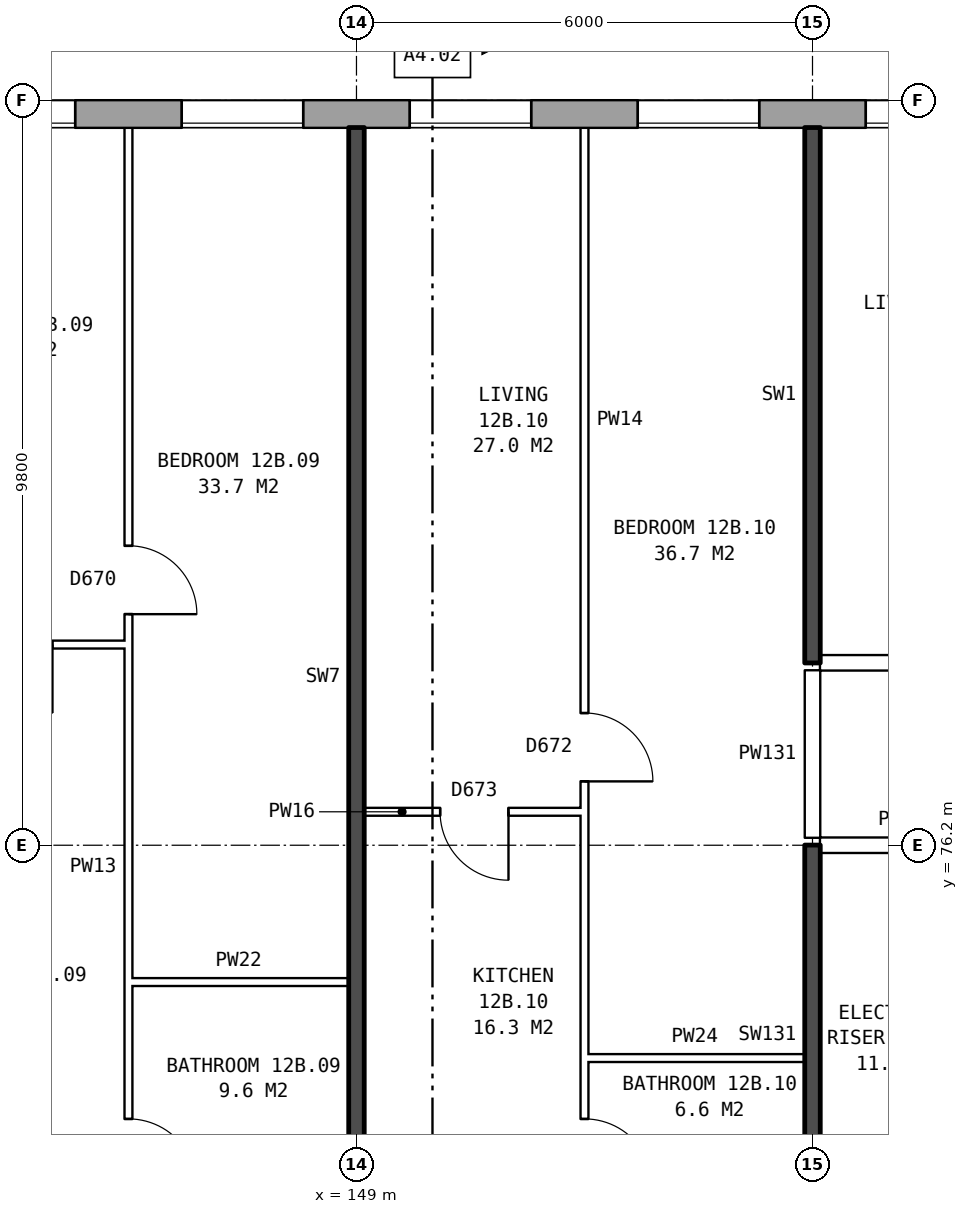
"""IFC4 building model, lengths in metres.
Left out: names, types, materials, properties, quantities, classifications, styles, units other than length and angle.
Written with IfcOpenShell. Run it as: python <this file> out.ifc"""

import sys

from ifc_helpers import new_model, si_unit, direction, frame, frame_2d, origin, place, context, subcontext, project, spatial, rectangle, extrude, element, fill, save


model = new_model("IFC4")
c1 = context("Model", 3, precision=1e-05, world=origin(), true_north=direction((0.0, 1.0)))
c2 = subcontext(c1, "Body", "Model", "MODEL_VIEW")
j1 = project(units=[si_unit("LENGTHUNIT", "METRE"), si_unit("PLANEANGLEUNIT", "RADIAN")], contexts=[c1])
p1 = place(None, origin())
s1 = spatial("IfcSite", under=j1, at=p1, CompositionType="ELEMENT")
p2 = place(p1, origin())
s2 = spatial("IfcBuilding", under=s1, at=p2, CompositionType="ELEMENT")
p3 = place(p2, frame((0.0, 0.0, 47.4)))
s3 = spatial("IfcBuildingStorey", under=s2, at=p3, CompositionType="ELEMENT", Elevation=47.4)
p4 = place(p3, frame((173.425, 85.82, 0.0), z_axis=(0.0, 0.0, 1.0), x_axis=(-1.0, 0.0, 0.0)))
e1 = element("IfcWall", 1, at=p4, inside=s3, PredefinedType="STANDARD", context=c2, shape_type="SweptSolid", body=[
    extrude(rectangle(XDim=39.351, YDim=0.36, at=frame_2d((19.675, 0.0))), origin(), (0.0, 0.0, 1.0), 2.85),
])
p5 = place(p4, frame((0.625, 0.0, 0.8)))
e2 = element("IfcOpeningElement", 2, at=p5, cuts=e1, PredefinedType="OPENING", context=c2, shape_type="SweptSolid", body=[
    extrude(rectangle(XDim=1.0, YDim=1.8, at=frame_2d((0.5, 0.9))), frame((0.0, 0.19, 0.0), z_axis=(0.0, -1.0, 0.0), x_axis=(1.0, 0.0, 0.0)), (0.0, 0.0, 1.0), 0.38),
])
p6 = place(p4, frame((1.925, 0.0, 1.7)))
e3 = element("IfcOpeningElement", 3, at=p6, cuts=e1, PredefinedType="OPENING", context=c2, shape_type="SweptSolid", body=[
    extrude(rectangle(XDim=0.8, YDim=0.9, at=frame_2d((0.4, 0.45))), frame((0.0, 0.19, 0.0), z_axis=(0.0, -1.0, 0.0), x_axis=(1.0, 0.0, 0.0)), (0.0, 0.0, 1.0), 0.38),
])
p7 = place(p4, frame((7.125, 0.0, 0.8)))
e4 = element("IfcOpeningElement", 4, at=p7, cuts=e1, PredefinedType="OPENING", context=c2, shape_type="SweptSolid", body=[
    extrude(rectangle(XDim=1.6, YDim=1.8, at=frame_2d((0.8, 0.9))), frame((0.0, 0.19, 0.0), z_axis=(0.0, -1.0, 0.0), x_axis=(1.0, 0.0, 0.0)), (0.0, 0.0, 1.0), 0.38),
])
p8 = place(p4, frame((10.125, 0.0, 0.8)))
e5 = element("IfcOpeningElement", 5, at=p8, cuts=e1, PredefinedType="OPENING", context=c2, shape_type="SweptSolid", body=[
    extrude(rectangle(XDim=1.6, YDim=1.8, at=frame_2d((0.8, 0.9))), frame((0.0, 0.19, 0.0), z_axis=(0.0, -1.0, 0.0), x_axis=(1.0, 0.0, 0.0)), (0.0, 0.0, 1.0), 0.38),
])
p9 = place(p4, frame((13.125, 0.0, 0.8)))
e6 = element("IfcOpeningElement", 6, at=p9, cuts=e1, PredefinedType="OPENING", context=c2, shape_type="SweptSolid", body=[
    extrude(rectangle(XDim=1.6, YDim=1.8, at=frame_2d((0.8, 0.9))), frame((0.0, 0.19, 0.0), z_axis=(0.0, -1.0, 0.0), x_axis=(1.0, 0.0, 0.0)), (0.0, 0.0, 1.0), 0.38),
])
p10 = place(p4, frame((16.125, 0.0, 0.8)))
e7 = element("IfcOpeningElement", 7, at=p10, cuts=e1, PredefinedType="OPENING", context=c2, shape_type="SweptSolid", body=[
    extrude(rectangle(XDim=1.6, YDim=1.8, at=frame_2d((0.8, 0.9))), frame((0.0, 0.19, 0.0), z_axis=(0.0, -1.0, 0.0), x_axis=(1.0, 0.0, 0.0)), (0.0, 0.0, 1.0), 0.38),
])
p11 = place(p4, frame((19.125, 0.0, 0.8)))
e8 = element("IfcOpeningElement", 8, at=p11, cuts=e1, PredefinedType="OPENING", context=c2, shape_type="SweptSolid", body=[
    extrude(rectangle(XDim=1.6, YDim=1.8, at=frame_2d((0.8, 0.9))), frame((0.0, 0.19, 0.0), z_axis=(0.0, -1.0, 0.0), x_axis=(1.0, 0.0, 0.0)), (0.0, 0.0, 1.0), 0.38),
])
p12 = place(p4, frame((22.125, 0.0, 0.8)))
e9 = element("IfcOpeningElement", 9, at=p12, cuts=e1, PredefinedType="OPENING", context=c2, shape_type="SweptSolid", body=[
    extrude(rectangle(XDim=1.6, YDim=1.8, at=frame_2d((0.8, 0.9))), frame((0.0, 0.19, 0.0), z_axis=(0.0, -1.0, 0.0), x_axis=(1.0, 0.0, 0.0)), (0.0, 0.0, 1.0), 0.38),
])
p13 = place(p4, frame((25.125, 0.0, 0.8)))
e10 = element("IfcOpeningElement", 10, at=p13, cuts=e1, PredefinedType="OPENING", context=c2, shape_type="SweptSolid", body=[
    extrude(rectangle(XDim=1.6, YDim=1.8, at=frame_2d((0.8, 0.9))), frame((0.0, 0.19, 0.0), z_axis=(0.0, -1.0, 0.0), x_axis=(1.0, 0.0, 0.0)), (0.0, 0.0, 1.0), 0.38),
])
p14 = place(p4, frame((28.125, 0.0, 0.8)))
e11 = element("IfcOpeningElement", 11, at=p14, cuts=e1, PredefinedType="OPENING", context=c2, shape_type="SweptSolid", body=[
    extrude(rectangle(XDim=1.6, YDim=1.8, at=frame_2d((0.8, 0.9))), frame((0.0, 0.19, 0.0), z_axis=(0.0, -1.0, 0.0), x_axis=(1.0, 0.0, 0.0)), (0.0, 0.0, 1.0), 0.38),
])
p15 = place(p4, frame((31.125, 0.0, 0.8)))
e12 = element("IfcOpeningElement", 12, at=p15, cuts=e1, PredefinedType="OPENING", context=c2, shape_type="SweptSolid", body=[
    extrude(rectangle(XDim=1.6, YDim=1.8, at=frame_2d((0.8, 0.9))), frame((0.0, 0.19, 0.0), z_axis=(0.0, -1.0, 0.0), x_axis=(1.0, 0.0, 0.0)), (0.0, 0.0, 1.0), 0.38),
])
p16 = place(p4, frame((33.025, 0.0, 0.8)))
e13 = element("IfcOpeningElement", 13, at=p16, cuts=e1, PredefinedType="OPENING", context=c2, shape_type="SweptSolid", body=[
    extrude(rectangle(XDim=1.2, YDim=1.8, at=frame_2d((0.6, 0.9))), frame((0.0, 0.19, 0.0), z_axis=(0.0, -1.0, 0.0), x_axis=(1.0, 0.0, 0.0)), (0.0, 0.0, 1.0), 0.38),
])
p17 = place(p4, frame((36.625, 0.0, 1.7)))
e14 = element("IfcOpeningElement", 14, at=p17, cuts=e1, PredefinedType="OPENING", context=c2, shape_type="SweptSolid", body=[
    extrude(rectangle(XDim=0.8, YDim=0.9, at=frame_2d((0.4, 0.45))), frame((0.0, 0.19, 0.0), z_axis=(0.0, -1.0, 0.0), x_axis=(1.0, 0.0, 0.0)), (0.0, 0.0, 1.0), 0.38),
])
p18 = place(p4, frame((3.925, 0.0, 0.8)))
e15 = element("IfcOpeningElement", 15, at=p18, cuts=e1, PredefinedType="OPENING", context=c2, shape_type="SweptSolid", body=[
    extrude(rectangle(XDim=0.8, YDim=0.9, at=frame_2d((0.4, 0.45))), frame((0.0, 0.19, 0.0), z_axis=(0.0, -1.0, 0.0), x_axis=(1.0, 0.0, 0.0)), (0.0, 0.0, 1.0), 0.38),
])
p19 = place(p4, frame((5.025, 0.0, 0.8)))
e16 = element("IfcOpeningElement", 16, at=p19, cuts=e1, PredefinedType="OPENING", context=c2, shape_type="SweptSolid", body=[
    extrude(rectangle(XDim=1.2, YDim=1.8, at=frame_2d((0.6, 0.9))), frame((0.0, 0.19, 0.0), z_axis=(0.0, -1.0, 0.0), x_axis=(1.0, 0.0, 0.0)), (0.0, 0.0, 1.0), 0.38),
])
p20 = place(p4, frame((34.525, 0.0, 0.8)))
e17 = element("IfcOpeningElement", 17, at=p20, cuts=e1, PredefinedType="OPENING", context=c2, shape_type="SweptSolid", body=[
    extrude(rectangle(XDim=0.8, YDim=0.9, at=frame_2d((0.4, 0.45))), frame((0.0, 0.19, 0.0), z_axis=(0.0, -1.0, 0.0), x_axis=(1.0, 0.0, 0.0)), (0.0, 0.0, 1.0), 0.38),
])
p21 = place(p4, frame((37.725, 0.0, 0.8)))
e18 = element("IfcOpeningElement", 18, at=p21, cuts=e1, PredefinedType="OPENING", context=c2, shape_type="SweptSolid", body=[
    extrude(rectangle(XDim=1.2, YDim=1.8, at=frame_2d((0.6, 0.9))), frame((0.0, 0.19, 0.0), z_axis=(0.0, -1.0, 0.0), x_axis=(1.0, 0.0, 0.0)), (0.0, 0.0, 1.0), 0.38),
])
for number, where, z_axis, x_axis in (
    (19, (152.0, 73.4, 0.0), (0.0, 0.0, 1.0), (1.0, 0.0, 0.0)),
    (20, (146.0, 74.4, 0.0), (0.0, 0.0, 1.0), (1.0, 0.0, 0.0)),
):
    element("IfcWall", number, at=place(p3, frame(where, z_axis=z_axis, x_axis=x_axis)), inside=s3, PredefinedType="PARTITIONING", context=c2, shape_type="SweptSolid", body=[
        extrude(rectangle(XDim=2.9, YDim=0.1, at=frame_2d((1.45, 0.0))), origin(), (0.0, 0.0, 1.0), 2.85),
    ])
p22 = place(p3, frame((155.1, 76.2, 0.0), z_axis=(0.0, 0.0, 1.0), x_axis=(1.0, 0.0, 0.0)))
e21 = element("IfcWall", 21, at=p22, inside=s3, PredefinedType="PARTITIONING", context=c2, shape_type="SweptSolid", body=[
    extrude(rectangle(XDim=2.14, YDim=0.2, at=frame_2d((1.07, 0.0))), origin(), (0.0, 0.0, 1.0), 2.85),
])
p23 = place(p3, frame((149.1, 76.64, 0.0), z_axis=(0.0, 0.0, 1.0), x_axis=(1.0, 0.0, 0.0)))
e22 = element("IfcWall", 22, at=p23, inside=s3, PredefinedType="PARTITIONING", context=c2, shape_type="SweptSolid", body=[
    extrude(rectangle(XDim=2.9, YDim=0.1, at=frame_2d((1.45, 0.0))), origin(), (0.0, 0.0, 1.0), 2.85),
])
p24 = place(p23, frame((1.0, 0.0, 0.0)))
e23 = element("IfcOpeningElement", 23, at=p24, cuts=e22, PredefinedType="OPENING", context=c2, shape_type="SweptSolid", body=[
    extrude(rectangle(XDim=0.9, YDim=2.1, at=frame_2d((0.45, 1.05))), frame((0.0, 0.06, 0.0), z_axis=(0.0, -1.0, 0.0), x_axis=(1.0, 0.0, 0.0)), (0.0, 0.0, 1.0), 0.12),
])
p25 = place(p3, frame((155.1, 78.6, 0.0), z_axis=(0.0, 0.0, 1.0), x_axis=(1.0, 0.0, 0.0)))
e24 = element("IfcWall", 24, at=p25, inside=s3, PredefinedType="PARTITIONING", context=c2, shape_type="SweptSolid", body=[
    extrude(rectangle(XDim=21.04, YDim=0.2, at=frame_2d((10.52, 0.0))), origin(), (0.0, 0.0, 1.0), 2.85),
])
p26 = place(p25, frame((2.45, 0.0, 0.0)))
e25 = element("IfcOpeningElement", 25, at=p26, cuts=e24, PredefinedType="OPENING", context=c2, shape_type="SweptSolid", body=[
    extrude(rectangle(XDim=1.0, YDim=2.1, at=frame_2d((0.5, 1.05))), frame((0.0, 0.11, 0.0), z_axis=(0.0, -1.0, 0.0), x_axis=(1.0, 0.0, 0.0)), (0.0, 0.0, 1.0), 0.22),
])
p27 = place(p25, frame((14.4, 0.0, 0.0)))
e26 = element("IfcOpeningElement", 26, at=p27, cuts=e24, PredefinedType="OPENING", context=c2, shape_type="SweptSolid", body=[
    extrude(rectangle(XDim=1.0, YDim=2.1, at=frame_2d((0.5, 1.05))), frame((0.0, 0.11, 0.0), z_axis=(0.0, -1.0, 0.0), x_axis=(1.0, 0.0, 0.0)), (0.0, 0.0, 1.0), 0.22),
])
p28 = place(p3, frame((143.1, 78.84, 0.0), z_axis=(0.0, 0.0, 1.0), x_axis=(1.0, 0.0, 0.0)))
e27 = element("IfcWall", 27, at=p28, inside=s3, PredefinedType="PARTITIONING", context=c2, shape_type="SweptSolid", body=[
    extrude(rectangle(XDim=2.9, YDim=0.1, at=frame_2d((1.45, 0.0))), origin(), (0.0, 0.0, 1.0), 2.85),
])
p29 = place(p28, frame((1.0, 0.0, 0.0)))
e28 = element("IfcOpeningElement", 28, at=p29, cuts=e27, PredefinedType="OPENING", context=c2, shape_type="SweptSolid", body=[
    extrude(rectangle(XDim=0.9, YDim=2.1, at=frame_2d((0.45, 1.05))), frame((0.0, 0.06, 0.0), z_axis=(0.0, -1.0, 0.0), x_axis=(1.0, 0.0, 0.0)), (0.0, 0.0, 1.0), 0.12),
])
p30 = place(p3, frame((146.0, 71.3, 0.0), z_axis=(0.0, 0.0, 1.0), x_axis=(0.0, 1.0, 0.0)))
e29 = element("IfcWall", 29, at=p30, inside=s3, PredefinedType="PARTITIONING", context=c2, shape_type="SweptSolid", body=[
    extrude(rectangle(XDim=14.34, YDim=0.1, at=frame_2d((7.17, 0.0))), origin(), (0.0, 0.0, 1.0), 2.85),
])
p31 = place(p30, frame((7.94, 0.0, 0.0)))
e30 = element("IfcOpeningElement", 30, at=p31, cuts=e29, PredefinedType="OPENING", context=c2, shape_type="SweptSolid", body=[
    extrude(rectangle(XDim=0.9, YDim=2.1, at=frame_2d((0.45, 1.05))), frame((0.0, 0.06, 0.0), z_axis=(0.0, -1.0, 0.0), x_axis=(1.0, 0.0, 0.0)), (0.0, 0.0, 1.0), 0.12),
])
p32 = place(p30, frame((0.4, 0.0, 0.0)))
e31 = element("IfcOpeningElement", 31, at=p32, cuts=e29, PredefinedType="OPENING", context=c2, shape_type="SweptSolid", body=[
    extrude(rectangle(XDim=0.9, YDim=2.1, at=frame_2d((0.45, 1.05))), frame((0.0, 0.06, 0.0), z_axis=(0.0, -1.0, 0.0), x_axis=(1.0, 0.0, 0.0)), (0.0, 0.0, 1.0), 0.12),
])
p33 = place(p3, frame((149.0, 71.2, 0.0), z_axis=(0.0, 0.0, 1.0), x_axis=(0.0, 1.0, 0.0)))
e32 = element("IfcWall", 32, at=p33, inside=s3, PredefinedType="SOLIDWALL", context=c2, shape_type="SweptSolid", body=[
    extrude(rectangle(XDim=14.44, YDim=0.2, at=frame_2d((7.22, 0.0))), origin(), (0.0, 0.0, 1.0), 2.85),
])
p34 = place(p3, frame((152.0, 71.3, 0.0), z_axis=(0.0, 0.0, 1.0), x_axis=(0.0, 1.0, 0.0)))
e33 = element("IfcWall", 33, at=p34, inside=s3, PredefinedType="PARTITIONING", context=c2, shape_type="SweptSolid", body=[
    extrude(rectangle(XDim=14.34, YDim=0.1, at=frame_2d((7.17, 0.0))), origin(), (0.0, 0.0, 1.0), 2.85),
])
p35 = place(p34, frame((5.74, 0.0, 0.0)))
e34 = element("IfcOpeningElement", 34, at=p35, cuts=e33, PredefinedType="OPENING", context=c2, shape_type="SweptSolid", body=[
    extrude(rectangle(XDim=0.9, YDim=2.1, at=frame_2d((0.45, 1.05))), frame((0.0, 0.06, 0.0), z_axis=(0.0, -1.0, 0.0), x_axis=(1.0, 0.0, 0.0)), (0.0, 0.0, 1.0), 0.12),
])
p36 = place(p34, frame((0.4, 0.0, 0.0)))
e35 = element("IfcOpeningElement", 35, at=p36, cuts=e33, PredefinedType="OPENING", context=c2, shape_type="SweptSolid", body=[
    extrude(rectangle(XDim=0.9, YDim=2.1, at=frame_2d((0.45, 1.05))), frame((0.0, 0.06, 0.0), z_axis=(0.0, -1.0, 0.0), x_axis=(1.0, 0.0, 0.0)), (0.0, 0.0, 1.0), 0.12),
])
p37 = place(p3, frame((155.0, 71.2, 0.0), z_axis=(0.0, 0.0, 1.0), x_axis=(0.0, 1.0, 0.0)))
e36 = element("IfcWall", 36, at=p37, inside=s3, PredefinedType="SOLIDWALL", context=c2, shape_type="SweptSolid", body=[
    extrude(rectangle(XDim=5.0, YDim=0.2, at=frame_2d((2.5, 0.0))), origin(), (0.0, 0.0, 1.0), 2.85),
])
p38 = place(p3, frame((155.0, 76.3, 0.0), z_axis=(0.0, 0.0, 1.0), x_axis=(0.0, 1.0, 0.0)))
e37 = element("IfcWall", 37, at=p38, inside=s3, PredefinedType="PARTITIONING", context=c2, shape_type="SweptSolid", body=[
    extrude(rectangle(XDim=2.2, YDim=0.2, at=frame_2d((1.1, 0.0))), origin(), (0.0, 0.0, 1.0), 2.85),
])
p39 = place(p3, frame((155.0, 78.6, 0.0), z_axis=(0.0, 0.0, 1.0), x_axis=(0.0, 1.0, 0.0)))
e38 = element("IfcWall", 38, at=p39, inside=s3, PredefinedType="SOLIDWALL", context=c2, shape_type="SweptSolid", body=[
    extrude(rectangle(XDim=7.04, YDim=0.2, at=frame_2d((3.52, 0.0))), origin(), (0.0, 0.0, 1.0), 2.85),
])
p40 = place(p10, origin())
e39 = element("IfcWindow", 39, at=p40, inside=s3, PartitioningType="SINGLE_PANEL", PredefinedType="WINDOW", context=c2, shape_type="SweptSolid", body=[
    extrude(rectangle(XDim=1.6, YDim=1.8, at=frame_2d((0.8, 0.9))), frame((0.0, 0.15, 0.0), z_axis=(0.0, -1.0, 0.0), x_axis=(1.0, 0.0, 0.0)), (0.0, 0.0, 1.0), 0.06),
])
fill(e7, e39)
p41 = place(p11, origin())
e40 = element("IfcWindow", 40, at=p41, inside=s3, PartitioningType="SINGLE_PANEL", PredefinedType="WINDOW", context=c2, shape_type="SweptSolid", body=[
    extrude(rectangle(XDim=1.6, YDim=1.8, at=frame_2d((0.8, 0.9))), frame((0.0, 0.15, 0.0), z_axis=(0.0, -1.0, 0.0), x_axis=(1.0, 0.0, 0.0)), (0.0, 0.0, 1.0), 0.06),
])
fill(e8, e40)
p42 = place(p12, origin())
e41 = element("IfcWindow", 41, at=p42, inside=s3, PartitioningType="SINGLE_PANEL", PredefinedType="WINDOW", context=c2, shape_type="SweptSolid", body=[
    extrude(rectangle(XDim=1.6, YDim=1.8, at=frame_2d((0.8, 0.9))), frame((0.0, 0.15, 0.0), z_axis=(0.0, -1.0, 0.0), x_axis=(1.0, 0.0, 0.0)), (0.0, 0.0, 1.0), 0.06),
])
fill(e9, e41)
p43 = place(p13, origin())
e42 = element("IfcWindow", 42, at=p43, inside=s3, PartitioningType="SINGLE_PANEL", PredefinedType="WINDOW", context=c2, shape_type="SweptSolid", body=[
    extrude(rectangle(XDim=1.6, YDim=1.8, at=frame_2d((0.8, 0.9))), frame((0.0, 0.15, 0.0), z_axis=(0.0, -1.0, 0.0), x_axis=(1.0, 0.0, 0.0)), (0.0, 0.0, 1.0), 0.06),
])
fill(e10, e42)
p44 = place(p14, origin())
e43 = element("IfcWindow", 43, at=p44, inside=s3, PartitioningType="SINGLE_PANEL", PredefinedType="WINDOW", context=c2, shape_type="SweptSolid", body=[
    extrude(rectangle(XDim=1.6, YDim=1.8, at=frame_2d((0.8, 0.9))), frame((0.0, 0.15, 0.0), z_axis=(0.0, -1.0, 0.0), x_axis=(1.0, 0.0, 0.0)), (0.0, 0.0, 1.0), 0.06),
])
fill(e11, e43)
p45 = place(p31, frame((0.9, 0.0, 0.0), z_axis=(0.0, 0.0, 1.0), x_axis=(-1.0, 0.0, 0.0)))
e44 = element("IfcDoor", 44, at=p45, inside=s3, OperationType="SINGLE_SWING_RIGHT", PredefinedType="DOOR", context=c2, shape_type="SweptSolid", body=[
    extrude(rectangle(XDim=0.9, YDim=2.1, at=frame_2d((0.45, 1.05))), frame((0.0, 0.025, 0.0), z_axis=(0.0, -1.0, 0.0), x_axis=(1.0, 0.0, 0.0)), (0.0, 0.0, 1.0), 0.05),
])
fill(e30, e44)
p46 = place(p32, frame((0.9, 0.0, 0.0), z_axis=(0.0, 0.0, 1.0), x_axis=(-1.0, 0.0, 0.0)))
e45 = element("IfcDoor", 45, at=p46, inside=s3, OperationType="SINGLE_SWING_RIGHT", PredefinedType="DOOR", context=c2, shape_type="SweptSolid", body=[
    extrude(rectangle(XDim=0.9, YDim=2.1, at=frame_2d((0.45, 1.05))), frame((0.0, 0.025, 0.0), z_axis=(0.0, -1.0, 0.0), x_axis=(1.0, 0.0, 0.0)), (0.0, 0.0, 1.0), 0.05),
])
fill(e31, e45)
p47 = place(p35, frame((0.9, 0.0, 0.0), z_axis=(0.0, 0.0, 1.0), x_axis=(-1.0, 0.0, 0.0)))
e46 = element("IfcDoor", 46, at=p47, inside=s3, OperationType="SINGLE_SWING_RIGHT", PredefinedType="DOOR", context=c2, shape_type="SweptSolid", body=[
    extrude(rectangle(XDim=0.9, YDim=2.1, at=frame_2d((0.45, 1.05))), frame((0.0, 0.025, 0.0), z_axis=(0.0, -1.0, 0.0), x_axis=(1.0, 0.0, 0.0)), (0.0, 0.0, 1.0), 0.05),
])
fill(e34, e46)
p48 = place(p24, frame((0.9, 0.0, 0.0), z_axis=(0.0, 0.0, 1.0), x_axis=(-1.0, 0.0, 0.0)))
e47 = element("IfcDoor", 47, at=p48, inside=s3, OperationType="SINGLE_SWING_LEFT", PredefinedType="DOOR", context=c2, shape_type="SweptSolid", body=[
    extrude(rectangle(XDim=0.9, YDim=2.1, at=frame_2d((0.45, 1.05))), frame((0.0, 0.025, 0.0), z_axis=(0.0, -1.0, 0.0), x_axis=(1.0, 0.0, 0.0)), (0.0, 0.0, 1.0), 0.05),
])
fill(e23, e47)
p49 = place(p36, frame((0.9, 0.0, 0.0), z_axis=(0.0, 0.0, 1.0), x_axis=(-1.0, 0.0, 0.0)))
e48 = element("IfcDoor", 48, at=p49, inside=s3, OperationType="SINGLE_SWING_RIGHT", PredefinedType="DOOR", context=c2, shape_type="SweptSolid", body=[
    extrude(rectangle(XDim=0.9, YDim=2.1, at=frame_2d((0.45, 1.05))), frame((0.0, 0.025, 0.0), z_axis=(0.0, -1.0, 0.0), x_axis=(1.0, 0.0, 0.0)), (0.0, 0.0, 1.0), 0.05),
])
fill(e35, e48)
save(model, sys.argv[1])
